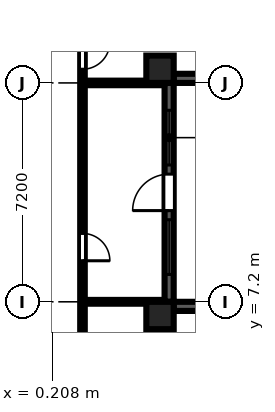
"""IFC4 building model, lengths in metres.
Left out: names, types, materials, properties, quantities, classifications, styles, units other than length and angle.
Written with IfcOpenShell. Run it as: python <this file> out.ifc"""

import sys

from ifc_helpers import new_model, si_unit, direction, frame, frame_2d, origin, origin_2d, place, context, subcontext, project, spatial, rectangle, extrude, element, fill, save


model = new_model("IFC4")
c1 = context("Model", 3, precision=1e-05, world=origin(), true_north=direction((0.0, 1.0)))
c2 = subcontext(c1, "Body", "Model", "MODEL_VIEW")
j1 = project(units=[si_unit("LENGTHUNIT", "METRE"), si_unit("PLANEANGLEUNIT", "RADIAN")], contexts=[c1])
p1 = place(None, origin())
s1 = spatial("IfcSite", under=j1, at=p1, CompositionType="ELEMENT")
p2 = place(p1, origin())
s2 = spatial("IfcBuilding", under=s1, at=p2, CompositionType="ELEMENT")
p3 = place(p2, frame((0.0, 0.0, 53.7)))
s3 = spatial("IfcBuildingStorey", under=s2, at=p3, CompositionType="ELEMENT", Elevation=53.7)
for number, where, z_axis, x_axis in (
    (1, (3.75, 6.75, 0.0), (0.0, 0.0, 1.0), (1.0, 0.0, 0.0)),
    (2, (3.75, 14.85, 0.0), (0.0, 0.0, 1.0), (1.0, 0.0, 0.0)),
):
    element("IfcColumn", number, at=place(p3, frame(where, z_axis=z_axis, x_axis=x_axis)), inside=s3, PredefinedType="COLUMN", context=c2, shape_type="SweptSolid", body=[
        extrude(rectangle(XDim=0.9, YDim=0.9, at=origin_2d()), origin(), (0.0, 0.0, 1.0), 3.0),
    ])
p4 = place(p3, frame((7.2, 7.05, 0.0), z_axis=(0.0, 0.0, 1.0), x_axis=(-1.0, 0.0, 0.0)))
e3 = element("IfcWall", 3, at=p4, inside=s3, PredefinedType="SOLIDWALL", context=c2, shape_type="SweptSolid", body=[
    extrude(rectangle(XDim=3.0, YDim=0.3, at=frame_2d((1.5, 0.0))), origin(), (0.0, 0.0, 1.0), 2.1),
])
p5 = place(p3, frame((4.05, 7.2, 0.0), z_axis=(0.0, 0.0, 1.0), x_axis=(0.0, 1.0, 0.0)))
e4 = element("IfcWall", 4, at=p5, inside=s3, PredefinedType="SOLIDWALL", context=c2, shape_type="SweptSolid", body=[
    extrude(rectangle(XDim=7.2, YDim=0.3, at=frame_2d((3.6, 0.0))), origin(), (0.0, 0.0, 1.0), 2.1),
])
p6 = place(p5, frame((3.0, 0.0, 0.0)))
e5 = element("IfcOpeningElement", 5, at=p6, cuts=e4, PredefinedType="OPENING", context=c2, shape_type="SweptSolid", body=[
    extrude(rectangle(XDim=1.2, YDim=2.05, at=frame_2d((0.6, 1.025))), frame((0.0, 0.16, 0.0), z_axis=(0.0, -1.0, 0.0), x_axis=(1.0, 0.0, 0.0)), (0.0, 0.0, 1.0), 0.32),
])
p7 = place(p5, frame((0.9, 0.0, 0.2)))
e6 = element("IfcOpeningElement", 6, at=p7, cuts=e4, PredefinedType="OPENING", context=c2, shape_type="SweptSolid", body=[
    extrude(rectangle(XDim=1.8, YDim=1.85, at=frame_2d((0.9, 0.925))), frame((0.0, 0.16, 0.0), z_axis=(0.0, -1.0, 0.0), x_axis=(1.0, 0.0, 0.0)), (0.0, 0.0, 1.0), 0.32),
])
p8 = place(p5, frame((4.5, 0.0, 0.2)))
e7 = element("IfcOpeningElement", 7, at=p8, cuts=e4, PredefinedType="OPENING", context=c2, shape_type="SweptSolid", body=[
    extrude(rectangle(XDim=1.8, YDim=1.85, at=frame_2d((0.9, 0.925))), frame((0.0, 0.16, 0.0), z_axis=(0.0, -1.0, 0.0), x_axis=(1.0, 0.0, 0.0)), (0.0, 0.0, 1.0), 0.32),
])
p9 = place(p3, frame((4.2, 14.55, 0.0), z_axis=(0.0, 0.0, 1.0), x_axis=(1.0, 0.0, 0.0)))
e8 = element("IfcWall", 8, at=p9, inside=s3, PredefinedType="SOLIDWALL", context=c2, shape_type="SweptSolid", body=[
    extrude(rectangle(XDim=2.1, YDim=0.3, at=frame_2d((1.05, 0.0))), origin(), (0.0, 0.0, 1.0), 2.1),
])
p10 = place(p3, frame((1.2, 1.125, 0.0), z_axis=(0.0, 0.0, 1.0), x_axis=(0.0, 1.0, 0.0)))
e9 = element("IfcWall", 9, at=p10, inside=s3, PredefinedType="PARTITIONING", context=c2, shape_type="SweptSolid", body=[
    extrude(rectangle(XDim=35.375, YDim=0.15, at=frame_2d((17.688, 0.0))), origin(), (0.0, 0.0, 1.0), 2.575),
])
p11 = place(p10, frame((2.625, 0.0, 0.0)))
e10 = element("IfcOpeningElement", 10, at=p11, cuts=e9, PredefinedType="OPENING", context=c2, shape_type="SweptSolid", body=[
    extrude(rectangle(XDim=0.9, YDim=2.1, at=frame_2d((0.45, 1.05))), frame((0.0, 0.085, 0.0), z_axis=(0.0, -1.0, 0.0), x_axis=(1.0, 0.0, 0.0)), (0.0, 0.0, 1.0), 0.17),
])
p12 = place(p10, frame((7.425, 0.0, 0.0)))
e11 = element("IfcOpeningElement", 11, at=p12, cuts=e9, PredefinedType="OPENING", context=c2, shape_type="SweptSolid", body=[
    extrude(rectangle(XDim=0.9, YDim=2.1, at=frame_2d((0.45, 1.05))), frame((0.0, 0.085, 0.0), z_axis=(0.0, -1.0, 0.0), x_axis=(1.0, 0.0, 0.0)), (0.0, 0.0, 1.0), 0.17),
])
p13 = place(p10, frame((13.725, 0.0, 0.0)))
e12 = element("IfcOpeningElement", 12, at=p13, cuts=e9, PredefinedType="OPENING", context=c2, shape_type="SweptSolid", body=[
    extrude(rectangle(XDim=0.9, YDim=2.1, at=frame_2d((0.45, 1.05))), frame((0.0, 0.085, 0.0), z_axis=(0.0, -1.0, 0.0), x_axis=(1.0, 0.0, 0.0)), (0.0, 0.0, 1.0), 0.17),
])
p14 = place(p10, frame((15.525, 0.0, 0.0)))
e13 = element("IfcOpeningElement", 13, at=p14, cuts=e9, PredefinedType="OPENING", context=c2, shape_type="SweptSolid", body=[
    extrude(rectangle(XDim=0.9, YDim=2.1, at=frame_2d((0.45, 1.05))), frame((0.0, 0.085, 0.0), z_axis=(0.0, -1.0, 0.0), x_axis=(1.0, 0.0, 0.0)), (0.0, 0.0, 1.0), 0.17),
])
p15 = place(p10, frame((32.825, 0.0, 0.0)))
e14 = element("IfcOpeningElement", 14, at=p15, cuts=e9, PredefinedType="OPENING", context=c2, shape_type="SweptSolid", body=[
    extrude(rectangle(XDim=1.0, YDim=2.1, at=frame_2d((0.5, 1.05))), frame((0.0, 0.085, 0.0), z_axis=(0.0, -1.0, 0.0), x_axis=(1.0, 0.0, 0.0)), (0.0, 0.0, 1.0), 0.17),
])
p16 = place(p3, frame((1.275, 7.2, 0.0), z_axis=(0.0, 0.0, 1.0), x_axis=(1.0, 0.0, 0.0)))
e15 = element("IfcWall", 15, at=p16, inside=s3, PredefinedType="PARTITIONING", context=c2, shape_type="SweptSolid", body=[
    extrude(rectangle(XDim=2.625, YDim=0.125, at=frame_2d((1.312, 0.0))), origin(), (0.0, 0.0, 1.0), 2.575),
])
p17 = place(p3, frame((1.275, 14.4, 0.0), z_axis=(0.0, 0.0, 1.0), x_axis=(1.0, 0.0, 0.0)))
e16 = element("IfcWall", 16, at=p17, inside=s3, PredefinedType="PARTITIONING", context=c2, shape_type="SweptSolid", body=[
    extrude(rectangle(XDim=2.625, YDim=0.15, at=frame_2d((1.312, 0.0))), origin(), (0.0, 0.0, 1.0), 2.575),
])
p18 = place(p6, origin())
e17 = element("IfcDoor", 17, at=p18, inside=s3, OperationType="SINGLE_SWING_LEFT", PredefinedType="DOOR", context=c2, shape_type="SweptSolid", body=[
    extrude(rectangle(XDim=1.2, YDim=2.05, at=frame_2d((0.6, 1.025))), frame((0.0, 0.025, 0.0), z_axis=(0.0, -1.0, 0.0), x_axis=(1.0, 0.0, 0.0)), (0.0, 0.0, 1.0), 0.05),
])
fill(e5, e17)
p19 = place(p7, origin())
e18 = element("IfcWindow", 18, at=p19, inside=s3, PartitioningType="SINGLE_PANEL", PredefinedType="WINDOW", context=c2, shape_type="SweptSolid", body=[
    extrude(rectangle(XDim=1.8, YDim=1.85, at=frame_2d((0.9, 0.925))), frame((0.0, 0.03, 0.0), z_axis=(0.0, -1.0, 0.0), x_axis=(1.0, 0.0, 0.0)), (0.0, 0.0, 1.0), 0.06),
])
fill(e6, e18)
p20 = place(p8, origin())
e19 = element("IfcWindow", 19, at=p20, inside=s3, PartitioningType="SINGLE_PANEL", PredefinedType="WINDOW", context=c2, shape_type="SweptSolid", body=[
    extrude(rectangle(XDim=1.8, YDim=1.85, at=frame_2d((0.9, 0.925))), frame((0.0, 0.03, 0.0), z_axis=(0.0, -1.0, 0.0), x_axis=(1.0, 0.0, 0.0)), (0.0, 0.0, 1.0), 0.06),
])
fill(e7, e19)
p21 = place(p12, frame((0.9, 0.0, 0.0), z_axis=(0.0, 0.0, 1.0), x_axis=(-1.0, 0.0, 0.0)))
e20 = element("IfcDoor", 20, at=p21, inside=s3, OperationType="SINGLE_SWING_RIGHT", PredefinedType="DOOR", context=c2, shape_type="SweptSolid", body=[
    extrude(rectangle(XDim=0.9, YDim=2.1, at=frame_2d((0.45, 1.05))), frame((0.0, 0.025, 0.0), z_axis=(0.0, -1.0, 0.0), x_axis=(1.0, 0.0, 0.0)), (0.0, 0.0, 1.0), 0.05),
])
fill(e11, e20)
p22 = place(p13, frame((0.9, 0.0, 0.0), z_axis=(0.0, 0.0, 1.0), x_axis=(-1.0, 0.0, 0.0)))
e21 = element("IfcDoor", 21, at=p22, inside=s3, OperationType="SINGLE_SWING_LEFT", PredefinedType="DOOR", context=c2, shape_type="SweptSolid", body=[
    extrude(rectangle(XDim=0.9, YDim=2.1, at=frame_2d((0.45, 1.05))), frame((0.0, 0.025, 0.0), z_axis=(0.0, -1.0, 0.0), x_axis=(1.0, 0.0, 0.0)), (0.0, 0.0, 1.0), 0.05),
])
fill(e12, e21)
save(model, sys.argv[1])
